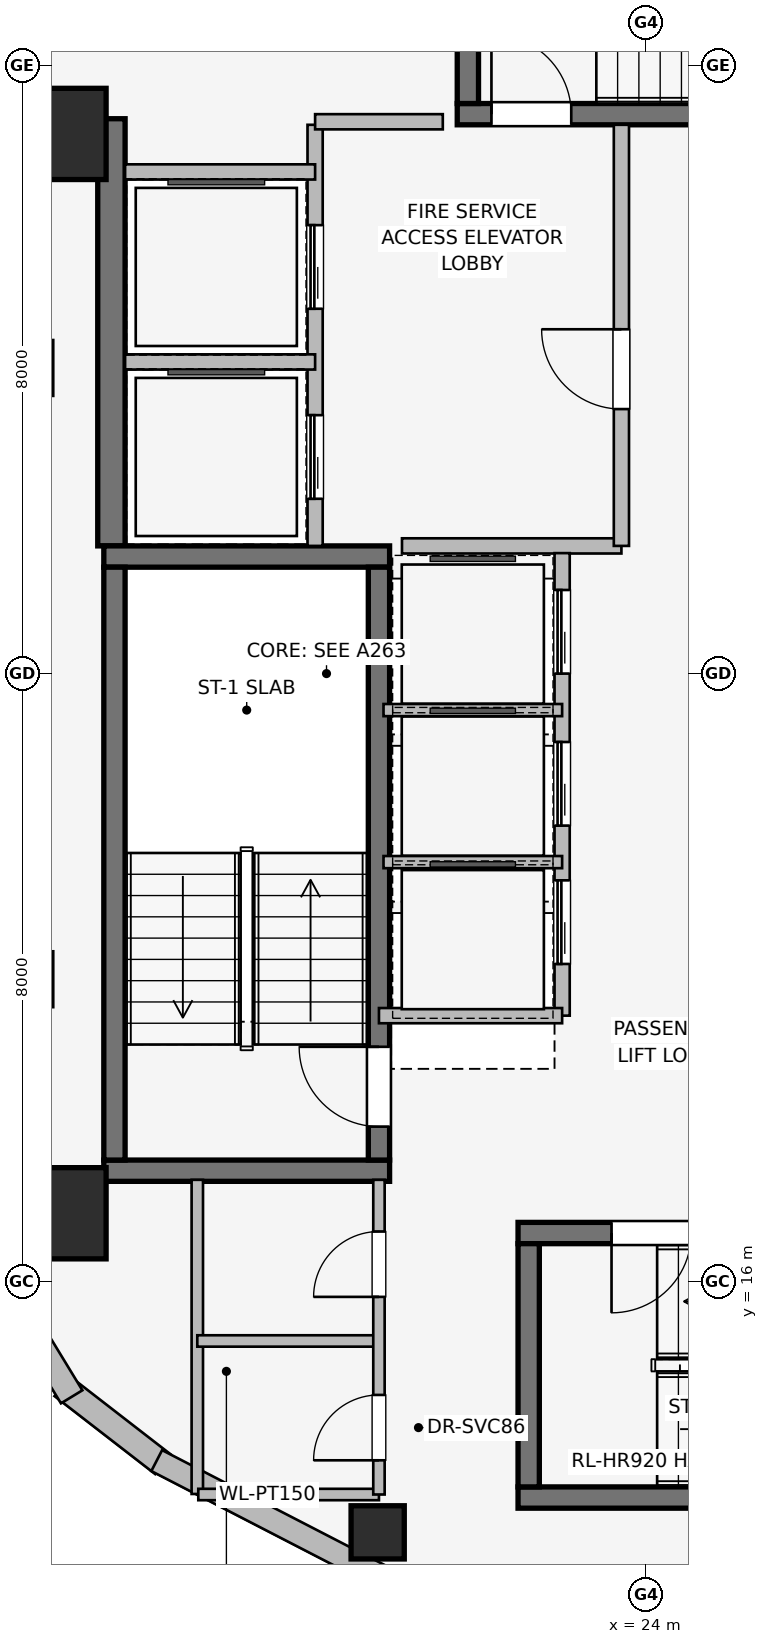
"""IFC4 building model, lengths in metres.
Left out: names, types, materials, properties, quantities, classifications, styles, units other than length and angle.
Written with IfcOpenShell. Run it as: python <this file> out.ifc"""

import sys

from ifc_helpers import new_model, si_unit, direction, frame, frame_2d, origin, origin_2d, place, context, subcontext, project, spatial, rectangle, extrude, element, fill, save


model = new_model("IFC4")
c1 = context("Model", 3, precision=1e-05, world=origin(), true_north=direction((0.0, 1.0)))
c2 = subcontext(c1, "Body", "Model", "MODEL_VIEW")
j1 = project(units=[si_unit("LENGTHUNIT", "METRE"), si_unit("PLANEANGLEUNIT", "RADIAN")], contexts=[c1])
p1 = place(None, origin())
s1 = spatial("IfcSite", under=j1, at=p1, CompositionType="ELEMENT")
p2 = place(p1, origin())
s2 = spatial("IfcBuilding", under=s1, at=p2, CompositionType="ELEMENT")
p3 = place(p2, frame((0.0, 0.0, 224.15)))
s3 = spatial("IfcBuildingStorey", under=s2, at=p3, CompositionType="ELEMENT", Elevation=224.15)
p4 = place(p3, frame((16.97, 25.68, 0.0), z_axis=(0.0, 0.0, 1.0), x_axis=(0.0, 1.0, 0.0)))
e1 = element("IfcWall", 1, at=p4, inside=s3, PredefinedType="SHEAR", context=c2, shape_type="SweptSolid", body=[
    extrude(rectangle(XDim=5.62, YDim=0.36, at=frame_2d((2.81, 0.0))), origin(), (0.0, 0.0, 1.0), 3.55),
])
for number, where, z_axis, x_axis in (
    (2, (16.87, 17.46, 0.0), (0.0, 0.0, 1.0), (1.0, 0.0, 0.0)),
    (3, (20.63, 25.54, 0.0), (0.0, 0.0, 1.0), (-1.0, 0.0, 0.0)),
):
    element("IfcWall", number, at=place(p3, frame(where, z_axis=z_axis, x_axis=x_axis)), inside=s3, PredefinedType="SHEAR", context=c2, shape_type="SweptSolid", body=[
        extrude(rectangle(XDim=3.76, YDim=0.28, at=frame_2d((1.88, 0.0))), origin(), (0.0, 0.0, 1.0), 3.55),
    ])
p5 = place(p3, frame((17.01, 25.4, 0.0), z_axis=(0.0, 0.0, 1.0), x_axis=(0.0, -1.0, 0.0)))
e4 = element("IfcWall", 4, at=p5, inside=s3, PredefinedType="SHEAR", context=c2, shape_type="SweptSolid", body=[
    extrude(rectangle(XDim=7.8, YDim=0.28, at=frame_2d((3.9, 0.0))), origin(), (0.0, 0.0, 1.0), 3.55),
])
p6 = place(p3, frame((20.49, 17.6, 0.0), z_axis=(0.0, 0.0, 1.0), x_axis=(0.0, 1.0, 0.0)))
e5 = element("IfcWall", 5, at=p6, inside=s3, PredefinedType="SHEAR", context=c2, shape_type="SweptSolid", body=[
    extrude(rectangle(XDim=7.8, YDim=0.28, at=frame_2d((3.9, 0.0))), origin(), (0.0, 0.0, 1.0), 3.55),
])
p7 = place(p6, frame((0.44, 0.0, 0.0)))
e6 = element("IfcOpeningElement", 6, at=p7, cuts=e5, PredefinedType="OPENING", context=c2, shape_type="SweptSolid", body=[
    extrude(rectangle(XDim=1.05, YDim=2.0, at=frame_2d((0.525, 1.0))), frame((0.0, 0.15, 0.0), z_axis=(0.0, -1.0, 0.0), x_axis=(1.0, 0.0, 0.0)), (0.0, 0.0, 1.0), 0.3),
])
p8 = place(p3, frame((22.32, 13.16, 0.0), z_axis=(0.0, 0.0, 1.0), x_axis=(1.0, 0.0, 0.0)))
e7 = element("IfcWall", 7, at=p8, inside=s3, PredefinedType="SHEAR", context=c2, shape_type="SweptSolid", body=[
    extrude(rectangle(XDim=8.36, YDim=0.28, at=frame_2d((4.18, 0.0))), origin(), (0.0, 0.0, 1.0), 3.55),
])
p9 = place(p3, frame((30.68, 16.64, 0.0), z_axis=(0.0, 0.0, 1.0), x_axis=(-1.0, 0.0, 0.0)))
e8 = element("IfcWall", 8, at=p9, inside=s3, PredefinedType="SHEAR", context=c2, shape_type="SweptSolid", body=[
    extrude(rectangle(XDim=8.36, YDim=0.28, at=frame_2d((4.18, 0.0))), origin(), (0.0, 0.0, 1.0), 3.55),
])
p10 = place(p9, frame((6.08, 0.0, 0.0)))
e9 = element("IfcOpeningElement", 9, at=p10, cuts=e8, PredefinedType="OPENING", context=c2, shape_type="SweptSolid", body=[
    extrude(rectangle(XDim=1.05, YDim=2.0, at=frame_2d((0.525, 1.0))), frame((0.0, 0.15, 0.0), z_axis=(0.0, -1.0, 0.0), x_axis=(1.0, 0.0, 0.0)), (0.0, 0.0, 1.0), 0.3),
])
p11 = place(p3, frame((22.46, 16.5, 0.0), z_axis=(0.0, 0.0, 1.0), x_axis=(0.0, -1.0, 0.0)))
e10 = element("IfcWall", 10, at=p11, inside=s3, PredefinedType="SHEAR", context=c2, shape_type="SweptSolid", body=[
    extrude(rectangle(XDim=3.2, YDim=0.28, at=frame_2d((1.6, 0.0))), origin(), (0.0, 0.0, 1.0), 3.55),
])
p12 = place(p3, frame((21.52, 31.36, 0.0), z_axis=(0.0, 0.0, 1.0), x_axis=(1.0, 0.0, 0.0)))
e11 = element("IfcWall", 11, at=p12, inside=s3, PredefinedType="SHEAR", context=c2, shape_type="SweptSolid", body=[
    extrude(rectangle(XDim=8.36, YDim=0.28, at=frame_2d((4.18, 0.0))), origin(), (0.0, 0.0, 1.0), 3.55),
])
p13 = place(p12, frame((0.45, 0.0, 0.0)))
e12 = element("IfcOpeningElement", 12, at=p13, cuts=e11, PredefinedType="OPENING", context=c2, shape_type="SweptSolid", body=[
    extrude(rectangle(XDim=1.05, YDim=2.0, at=frame_2d((0.525, 1.0))), frame((0.0, 0.15, 0.0), z_axis=(0.0, -1.0, 0.0), x_axis=(1.0, 0.0, 0.0)), (0.0, 0.0, 1.0), 0.3),
])
p14 = place(p3, frame((21.66, 34.7, 0.0), z_axis=(0.0, 0.0, 1.0), x_axis=(0.0, -1.0, 0.0)))
e13 = element("IfcWall", 13, at=p14, inside=s3, PredefinedType="SHEAR", context=c2, shape_type="SweptSolid", body=[
    extrude(rectangle(XDim=3.2, YDim=0.28, at=frame_2d((1.6, 0.0))), origin(), (0.0, 0.0, 1.0), 3.55),
])
for number, where, z_axis, x_axis in (
    (14, (16.3, 16.9, 0.0), (0.0, 0.0, 1.0), (1.0, 0.0, 0.0)),
    (15, (16.3, 31.1, 0.0), (0.0, 0.0, 1.0), (1.0, 0.0, 0.0)),
):
    element("IfcColumn", number, at=place(p3, frame(where, z_axis=z_axis, x_axis=x_axis)), inside=s3, PredefinedType="COLUMN", context=c2, shape_type="SweptSolid", body=[
        extrude(rectangle(XDim=1.2, YDim=1.2, at=origin_2d()), origin(), (0.0, 0.0, 1.0), 3.55),
    ])
p15 = place(p3, frame((20.473, 12.702, 0.0), z_axis=(0.0, 0.0, 1.0), x_axis=(1.0, 0.0, 0.0)))
e16 = element("IfcColumn", 16, at=p15, inside=s3, PredefinedType="COLUMN", context=c2, shape_type="SweptSolid", body=[
    extrude(rectangle(XDim=0.7, YDim=0.7, at=origin_2d()), origin(), (0.0, 0.0, 1.0), 3.55),
])
p16 = place(p3, frame((15.574, 32.082, 0.0), z_axis=(0.0, 0.0, 1.0), x_axis=(0.520325409202, 0.853968072318, 0.0)))
e17 = element("IfcWall", 17, at=p16, inside=s3, PredefinedType="STANDARD", context=c2, shape_type="SweptSolid", body=[
    extrude(rectangle(XDim=1.678, YDim=0.33, at=frame_2d((0.839, 0.0))), origin(), (0.0, 0.0, 1.0), 3.29),
])
p17 = place(p3, frame((17.647, 13.599, 0.0), z_axis=(0.0, 0.0, 1.0), x_axis=(-0.790691856293, 0.61221433207, 0.0)))
e18 = element("IfcWall", 18, at=p17, inside=s3, PredefinedType="STANDARD", context=c2, shape_type="SweptSolid", body=[
    extrude(rectangle(XDim=1.676, YDim=0.33, at=frame_2d((0.838, 0.0))), origin(), (0.0, 0.0, 1.0), 3.29),
])
p18 = place(p3, frame((16.447, 14.485, 0.0), z_axis=(0.0, 0.0, 1.0), x_axis=(-0.520325409202, 0.853968072318, 0.0)))
e19 = element("IfcWall", 19, at=p18, inside=s3, PredefinedType="STANDARD", context=c2, shape_type="SweptSolid", body=[
    extrude(rectangle(XDim=1.678, YDim=0.33, at=frame_2d((0.839, 0.0))), origin(), (0.0, 0.0, 1.0), 3.29),
])
p19 = place(p3, frame((30.963, 6.73, 0.0), z_axis=(0.0, 0.0, 1.0), x_axis=(-0.888581481622, 0.458718814218, 0.0)))
e20 = element("IfcWall", 20, at=p19, inside=s3, PredefinedType="STANDARD", context=c2, shape_type="SweptSolid", body=[
    extrude(rectangle(XDim=15.077, YDim=0.31, at=frame_2d((7.539, 0.0))), origin(), (0.0, 0.0, 1.0), 2.594),
])
p20 = place(p19, frame((0.998, 0.0, 0.75)))
e21 = element("IfcOpeningElement", 21, at=p20, cuts=e20, PredefinedType="OPENING", context=c2, shape_type="SweptSolid", body=[
    extrude(rectangle(XDim=1.05, YDim=1.4, at=frame_2d((0.525, 0.7))), frame((0.0, 0.165, 0.0), z_axis=(0.0, -1.0, 0.0), x_axis=(1.0, 0.0, 0.0)), (0.0, 0.0, 1.0), 0.33),
])
p21 = place(p19, frame((4.176, 0.0, 0.75)))
e22 = element("IfcOpeningElement", 22, at=p21, cuts=e20, PredefinedType="OPENING", context=c2, shape_type="SweptSolid", body=[
    extrude(rectangle(XDim=1.05, YDim=1.4, at=frame_2d((0.525, 0.7))), frame((0.0, 0.165, 0.0), z_axis=(0.0, -1.0, 0.0), x_axis=(1.0, 0.0, 0.0)), (0.0, 0.0, 1.0), 0.33),
])
p22 = place(p19, frame((6.509, 0.0, 0.75)))
e23 = element("IfcOpeningElement", 23, at=p22, cuts=e20, PredefinedType="OPENING", context=c2, shape_type="SweptSolid", body=[
    extrude(rectangle(XDim=1.05, YDim=1.4, at=frame_2d((0.525, 0.7))), frame((0.0, 0.165, 0.0), z_axis=(0.0, -1.0, 0.0), x_axis=(1.0, 0.0, 0.0)), (0.0, 0.0, 1.0), 0.33),
])
p23 = place(p19, frame((8.842, 0.0, 0.75)))
e24 = element("IfcOpeningElement", 24, at=p23, cuts=e20, PredefinedType="OPENING", context=c2, shape_type="SweptSolid", body=[
    extrude(rectangle(XDim=1.05, YDim=1.4, at=frame_2d((0.525, 0.7))), frame((0.0, 0.165, 0.0), z_axis=(0.0, -1.0, 0.0), x_axis=(1.0, 0.0, 0.0)), (0.0, 0.0, 1.0), 0.33),
])
p24 = place(p3, frame((19.65, 25.68, 0.0), z_axis=(0.0, 0.0, 1.0), x_axis=(0.0, 1.0, 0.0)))
e25 = element("IfcWall", 25, at=p24, inside=s3, PredefinedType="PARTITIONING", context=c2, shape_type="SweptSolid", body=[
    extrude(rectangle(XDim=5.54, YDim=0.2, at=frame_2d((2.77, 0.0))), origin(), (0.0, 0.0, 1.0), 3.29),
])
p25 = place(p24, frame((0.62, 0.0, 0.0)))
e26 = element("IfcOpeningElement", 26, at=p25, cuts=e25, PredefinedType="OPENING", context=c2, shape_type="SweptSolid", body=[
    extrude(rectangle(XDim=1.1, YDim=2.2, at=frame_2d((0.55, 1.1))), frame((0.0, 0.11, 0.0), z_axis=(0.0, -1.0, 0.0), x_axis=(1.0, 0.0, 0.0)), (0.0, 0.0, 1.0), 0.22),
])
p26 = place(p24, frame((3.12, 0.0, 0.0)))
e27 = element("IfcOpeningElement", 27, at=p26, cuts=e25, PredefinedType="OPENING", context=c2, shape_type="SweptSolid", body=[
    extrude(rectangle(XDim=1.1, YDim=2.2, at=frame_2d((0.55, 1.1))), frame((0.0, 0.11, 0.0), z_axis=(0.0, -1.0, 0.0), x_axis=(1.0, 0.0, 0.0)), (0.0, 0.0, 1.0), 0.22),
])
p27 = place(p3, frame((20.793, 25.68, 0.0), z_axis=(0.0, 0.0, 1.0), x_axis=(1.0, 0.0, 0.0)))
e28 = element("IfcWall", 28, at=p27, inside=s3, PredefinedType="PARTITIONING", context=c2, shape_type="SweptSolid", body=[
    extrude(rectangle(XDim=2.887, YDim=0.2, at=frame_2d((1.443, 0.0))), origin(), (0.0, 0.0, 1.0), 3.29),
])
p28 = place(p3, frame((23.68, 25.68, 0.0), z_axis=(0.0, 0.0, 1.0), x_axis=(0.0, 1.0, 0.0)))
e29 = element("IfcWall", 29, at=p28, inside=s3, PredefinedType="PARTITIONING", context=c2, shape_type="SweptSolid", body=[
    extrude(rectangle(XDim=5.54, YDim=0.2, at=frame_2d((2.77, 0.0))), origin(), (0.0, 0.0, 1.0), 3.29),
])
p29 = place(p28, frame((1.8, 0.0, 0.0)))
e30 = element("IfcOpeningElement", 30, at=p29, cuts=e29, PredefinedType="OPENING", context=c2, shape_type="SweptSolid", body=[
    extrude(rectangle(XDim=1.05, YDim=2.0, at=frame_2d((0.525, 1.0))), frame((0.0, 0.11, 0.0), z_axis=(0.0, -1.0, 0.0), x_axis=(1.0, 0.0, 0.0)), (0.0, 0.0, 1.0), 0.22),
])
p30 = place(p3, frame((21.33, 31.26, 0.0), z_axis=(0.0, 0.0, 1.0), x_axis=(-1.0, 0.0, 0.0)))
e31 = element("IfcWall", 31, at=p30, inside=s3, PredefinedType="PARTITIONING", context=c2, shape_type="SweptSolid", body=[
    extrude(rectangle(XDim=1.68, YDim=0.2, at=frame_2d((0.84, 0.0))), origin(), (0.0, 0.0, 1.0), 3.29),
])
p31 = place(p3, frame((17.15, 28.1, 0.0), z_axis=(0.0, 0.0, 1.0), x_axis=(1.0, 0.0, 0.0)))
e32 = element("IfcWall", 32, at=p31, inside=s3, PredefinedType="PARTITIONING", context=c2, shape_type="SweptSolid", body=[
    extrude(rectangle(XDim=2.5, YDim=0.2, at=frame_2d((1.25, 0.0))), origin(), (0.0, 0.0, 1.0), 3.29),
])
p32 = place(p3, frame((19.65, 30.6, 0.0), z_axis=(0.0, 0.0, 1.0), x_axis=(-1.0, 0.0, 0.0)))
e33 = element("IfcWall", 33, at=p32, inside=s3, PredefinedType="PARTITIONING", context=c2, shape_type="SweptSolid", body=[
    extrude(rectangle(XDim=2.5, YDim=0.2, at=frame_2d((1.25, 0.0))), origin(), (0.0, 0.0, 1.0), 2.19),
])
p33 = place(p3, frame((22.9, 19.5, 0.0), z_axis=(0.0, 0.0, 1.0), x_axis=(0.0, 1.0, 0.0)))
e34 = element("IfcWall", 34, at=p33, inside=s3, PredefinedType="PARTITIONING", context=c2, shape_type="SweptSolid", body=[
    extrude(rectangle(XDim=6.085, YDim=0.2, at=frame_2d((3.042, 0.0))), origin(), (0.0, 0.0, 1.0), 3.29),
])
p34 = place(p33, frame((0.68, 0.0, 0.0)))
e35 = element("IfcOpeningElement", 35, at=p34, cuts=e34, PredefinedType="OPENING", context=c2, shape_type="SweptSolid", body=[
    extrude(rectangle(XDim=1.1, YDim=2.2, at=frame_2d((0.55, 1.1))), frame((0.0, 0.11, 0.0), z_axis=(0.0, -1.0, 0.0), x_axis=(1.0, 0.0, 0.0)), (0.0, 0.0, 1.0), 0.22),
])
p35 = place(p33, frame((2.5, 0.0, 0.0)))
e36 = element("IfcOpeningElement", 36, at=p35, cuts=e34, PredefinedType="OPENING", context=c2, shape_type="SweptSolid", body=[
    extrude(rectangle(XDim=1.1, YDim=2.2, at=frame_2d((0.55, 1.1))), frame((0.0, 0.11, 0.0), z_axis=(0.0, -1.0, 0.0), x_axis=(1.0, 0.0, 0.0)), (0.0, 0.0, 1.0), 0.22),
])
p36 = place(p33, frame((4.5, 0.0, 0.0)))
e37 = element("IfcOpeningElement", 37, at=p36, cuts=e34, PredefinedType="OPENING", context=c2, shape_type="SweptSolid", body=[
    extrude(rectangle(XDim=1.1, YDim=2.2, at=frame_2d((0.55, 1.1))), frame((0.0, 0.11, 0.0), z_axis=(0.0, -1.0, 0.0), x_axis=(1.0, 0.0, 0.0)), (0.0, 0.0, 1.0), 0.22),
])
p37 = place(p3, frame((20.49, 19.5, 0.0), z_axis=(0.0, 0.0, 1.0), x_axis=(1.0, 0.0, 0.0)))
e38 = element("IfcWall", 38, at=p37, inside=s3, PredefinedType="PARTITIONING", context=c2, shape_type="SweptSolid", body=[
    extrude(rectangle(XDim=2.41, YDim=0.2, at=frame_2d((1.205, 0.0))), origin(), (0.0, 0.0, 1.0), 2.19),
])
for number, where, z_axis, x_axis in (
    (39, (20.55, 21.52, 0.0), (0.0, 0.0, 1.0), (1.0, 0.0, 0.0)),
    (40, (20.55, 23.52, 0.0), (0.0, 0.0, 1.0), (1.0, 0.0, 0.0)),
):
    element("IfcWall", number, at=place(p3, frame(where, z_axis=z_axis, x_axis=x_axis)), inside=s3, PredefinedType="PARTITIONING", context=c2, shape_type="SweptSolid", body=[
        extrude(rectangle(XDim=2.35, YDim=0.16, at=frame_2d((1.175, 0.0))), origin(), (0.0, 0.0, 1.0), 3.29),
    ])
p38 = place(p3, frame((18.1, 17.34, 0.0), z_axis=(0.0, 0.0, 1.0), x_axis=(0.0, -1.0, 0.0)))
e41 = element("IfcWall", 41, at=p38, inside=s3, PredefinedType="PARTITIONING", context=c2, shape_type="SweptSolid", body=[
    extrude(rectangle(XDim=4.133, YDim=0.15, at=frame_2d((2.066, 0.0))), origin(), (0.0, 0.0, 1.0), 3.29),
])
p39 = place(p3, frame((18.113, 13.2, 0.0), z_axis=(0.0, 0.0, 1.0), x_axis=(1.0, 0.0, 0.0)))
e42 = element("IfcWall", 42, at=p39, inside=s3, PredefinedType="PARTITIONING", context=c2, shape_type="SweptSolid", body=[
    extrude(rectangle(XDim=2.377, YDim=0.15, at=frame_2d((1.188, 0.0))), origin(), (0.0, 0.0, 1.0), 3.29),
])
p40 = place(p3, frame((18.1, 15.22, 0.0), z_axis=(0.0, 0.0, 1.0), x_axis=(1.0, 0.0, 0.0)))
e43 = element("IfcWall", 43, at=p40, inside=s3, PredefinedType="PARTITIONING", context=c2, shape_type="SweptSolid", body=[
    extrude(rectangle(XDim=2.39, YDim=0.15, at=frame_2d((1.195, 0.0))), origin(), (0.0, 0.0, 1.0), 3.29),
])
p41 = place(p3, frame((20.49, 13.2, 0.0), z_axis=(0.0, 0.0, 1.0), x_axis=(0.0, 1.0, 0.0)))
e44 = element("IfcWall", 44, at=p41, inside=s3, PredefinedType="PARTITIONING", context=c2, shape_type="SweptSolid", body=[
    extrude(rectangle(XDim=4.14, YDim=0.15, at=frame_2d((2.07, 0.0))), origin(), (0.0, 0.0, 1.0), 3.29),
])
p42 = place(p41, frame((0.45, 0.0, 0.0)))
e45 = element("IfcOpeningElement", 45, at=p42, cuts=e44, PredefinedType="OPENING", context=c2, shape_type="SweptSolid", body=[
    extrude(rectangle(XDim=0.86, YDim=2.0, at=frame_2d((0.43, 1.0))), frame((0.0, 0.085, 0.0), z_axis=(0.0, -1.0, 0.0), x_axis=(1.0, 0.0, 0.0)), (0.0, 0.0, 1.0), 0.17),
])
p43 = place(p41, frame((2.6, 0.0, 0.0)))
e46 = element("IfcOpeningElement", 46, at=p43, cuts=e44, PredefinedType="OPENING", context=c2, shape_type="SweptSolid", body=[
    extrude(rectangle(XDim=0.86, YDim=2.0, at=frame_2d((0.43, 1.0))), frame((0.0, 0.085, 0.0), z_axis=(0.0, -1.0, 0.0), x_axis=(1.0, 0.0, 0.0)), (0.0, 0.0, 1.0), 0.17),
])
p44 = place(p7, origin())
e47 = element("IfcDoor", 47, at=p44, inside=s3, OperationType="SINGLE_SWING_RIGHT", PredefinedType="DOOR", context=c2, shape_type="SweptSolid", body=[
    extrude(rectangle(XDim=1.05, YDim=2.0, at=frame_2d((0.525, 1.0))), frame((0.0, 0.025, 0.0), z_axis=(0.0, -1.0, 0.0), x_axis=(1.0, 0.0, 0.0)), (0.0, 0.0, 1.0), 0.05),
])
fill(e6, e47)
p45 = place(p10, origin())
e48 = element("IfcDoor", 48, at=p45, inside=s3, OperationType="SINGLE_SWING_RIGHT", PredefinedType="DOOR", context=c2, shape_type="SweptSolid", body=[
    extrude(rectangle(XDim=1.05, YDim=2.0, at=frame_2d((0.525, 1.0))), frame((0.0, 0.025, 0.0), z_axis=(0.0, -1.0, 0.0), x_axis=(1.0, 0.0, 0.0)), (0.0, 0.0, 1.0), 0.05),
])
fill(e9, e48)
p46 = place(p13, origin())
e49 = element("IfcDoor", 49, at=p46, inside=s3, OperationType="SINGLE_SWING_LEFT", PredefinedType="DOOR", context=c2, shape_type="SweptSolid", body=[
    extrude(rectangle(XDim=1.05, YDim=2.0, at=frame_2d((0.525, 1.0))), frame((0.0, 0.025, 0.0), z_axis=(0.0, -1.0, 0.0), x_axis=(1.0, 0.0, 0.0)), (0.0, 0.0, 1.0), 0.05),
])
fill(e12, e49)
p47 = place(p25, origin())
e50 = element("IfcDoor", 50, at=p47, inside=s3, OperationType="SLIDING_TO_LEFT", PredefinedType="DOOR", context=c2, shape_type="SweptSolid", body=[
    extrude(rectangle(XDim=1.1, YDim=2.2, at=frame_2d((0.55, 1.1))), frame((0.0, 0.025, 0.0), z_axis=(0.0, -1.0, 0.0), x_axis=(1.0, 0.0, 0.0)), (0.0, 0.0, 1.0), 0.05),
])
fill(e26, e50)
p48 = place(p26, origin())
e51 = element("IfcDoor", 51, at=p48, inside=s3, OperationType="SLIDING_TO_LEFT", PredefinedType="DOOR", context=c2, shape_type="SweptSolid", body=[
    extrude(rectangle(XDim=1.1, YDim=2.2, at=frame_2d((0.55, 1.1))), frame((0.0, 0.025, 0.0), z_axis=(0.0, -1.0, 0.0), x_axis=(1.0, 0.0, 0.0)), (0.0, 0.0, 1.0), 0.05),
])
fill(e27, e51)
p49 = place(p29, origin())
e52 = element("IfcDoor", 52, at=p49, inside=s3, OperationType="SINGLE_SWING_RIGHT", PredefinedType="DOOR", context=c2, shape_type="SweptSolid", body=[
    extrude(rectangle(XDim=1.05, YDim=2.0, at=frame_2d((0.525, 1.0))), frame((0.0, 0.025, 0.0), z_axis=(0.0, -1.0, 0.0), x_axis=(1.0, 0.0, 0.0)), (0.0, 0.0, 1.0), 0.05),
])
fill(e30, e52)
p50 = place(p34, origin())
e53 = element("IfcDoor", 53, at=p50, inside=s3, OperationType="SLIDING_TO_LEFT", PredefinedType="DOOR", context=c2, shape_type="SweptSolid", body=[
    extrude(rectangle(XDim=1.1, YDim=2.2, at=frame_2d((0.55, 1.1))), frame((0.0, 0.025, 0.0), z_axis=(0.0, -1.0, 0.0), x_axis=(1.0, 0.0, 0.0)), (0.0, 0.0, 1.0), 0.05),
])
fill(e35, e53)
p51 = place(p35, origin())
e54 = element("IfcDoor", 54, at=p51, inside=s3, OperationType="SLIDING_TO_LEFT", PredefinedType="DOOR", context=c2, shape_type="SweptSolid", body=[
    extrude(rectangle(XDim=1.1, YDim=2.2, at=frame_2d((0.55, 1.1))), frame((0.0, 0.025, 0.0), z_axis=(0.0, -1.0, 0.0), x_axis=(1.0, 0.0, 0.0)), (0.0, 0.0, 1.0), 0.05),
])
fill(e36, e54)
p52 = place(p36, origin())
e55 = element("IfcDoor", 55, at=p52, inside=s3, OperationType="SLIDING_TO_LEFT", PredefinedType="DOOR", context=c2, shape_type="SweptSolid", body=[
    extrude(rectangle(XDim=1.1, YDim=2.2, at=frame_2d((0.55, 1.1))), frame((0.0, 0.025, 0.0), z_axis=(0.0, -1.0, 0.0), x_axis=(1.0, 0.0, 0.0)), (0.0, 0.0, 1.0), 0.05),
])
fill(e37, e55)
p53 = place(p42, origin())
e56 = element("IfcDoor", 56, at=p53, inside=s3, OperationType="SINGLE_SWING_LEFT", PredefinedType="DOOR", context=c2, shape_type="SweptSolid", body=[
    extrude(rectangle(XDim=0.86, YDim=2.0, at=frame_2d((0.43, 1.0))), frame((0.0, 0.025, 0.0), z_axis=(0.0, -1.0, 0.0), x_axis=(1.0, 0.0, 0.0)), (0.0, 0.0, 1.0), 0.05),
])
fill(e45, e56)
p54 = place(p43, origin())
e57 = element("IfcDoor", 57, at=p54, inside=s3, OperationType="SINGLE_SWING_LEFT", PredefinedType="DOOR", context=c2, shape_type="SweptSolid", body=[
    extrude(rectangle(XDim=0.86, YDim=2.0, at=frame_2d((0.43, 1.0))), frame((0.0, 0.025, 0.0), z_axis=(0.0, -1.0, 0.0), x_axis=(1.0, 0.0, 0.0)), (0.0, 0.0, 1.0), 0.05),
])
fill(e46, e57)
save(model, sys.argv[1])
